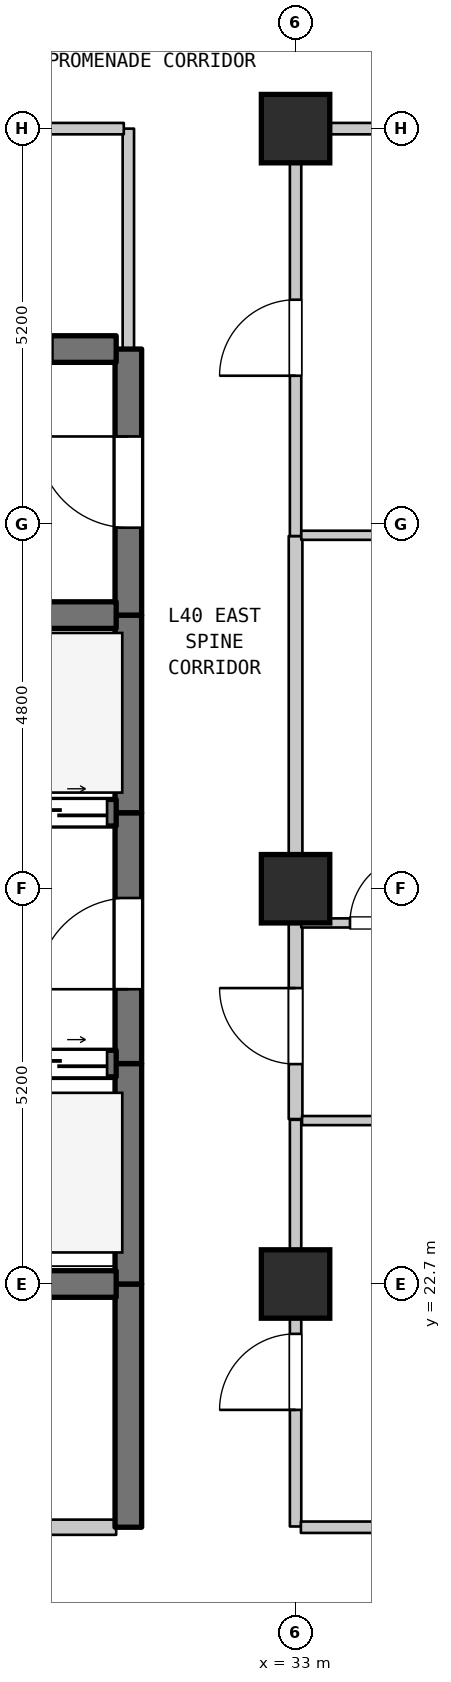
"""IFC4 building model, lengths in metres.
Left out: names, types, materials, properties, quantities, classifications, styles, units other than length and angle.
Written with IfcOpenShell. Run it as: python <this file> out.ifc"""

import sys

from ifc_helpers import new_model, si_unit, direction, frame, frame_2d, origin, origin_2d, place, context, subcontext, project, spatial, rectangle, extrude, element, fill, save


model = new_model("IFC4")
c1 = context("Model", 3, precision=1e-05, world=origin(), true_north=direction((0.0, 1.0)))
c2 = subcontext(c1, "Body", "Model", "MODEL_VIEW")
j1 = project(units=[si_unit("LENGTHUNIT", "METRE"), si_unit("PLANEANGLEUNIT", "RADIAN")], contexts=[c1])
p1 = place(None, origin())
s1 = spatial("IfcSite", under=j1, at=p1, CompositionType="ELEMENT")
p2 = place(p1, origin())
s2 = spatial("IfcBuilding", under=s1, at=p2, CompositionType="ELEMENT")
p3 = place(p2, frame((0.0, 0.0, 164.6)))
s3 = spatial("IfcBuildingStorey", under=s2, at=p3, CompositionType="ELEMENT", Elevation=164.6)
for number, where, z_axis, x_axis in (
    (1, (33.0, 22.7, 0.0), (0.0, 0.0, 1.0), (1.0, 0.0, 0.0)),
    (2, (33.0, 27.9, 0.0), (0.0, 0.0, 1.0), (1.0, 0.0, 0.0)),
    (3, (33.0, 37.9, 0.0), (0.0, 0.0, 1.0), (1.0, 0.0, 0.0)),
):
    element("IfcColumn", number, at=place(p3, frame(where, z_axis=z_axis, x_axis=x_axis)), inside=s3, PredefinedType="COLUMN", context=c2, shape_type="SweptSolid", body=[
        extrude(rectangle(XDim=0.9, YDim=0.9, at=origin_2d()), origin(), (0.0, 0.0, 1.0), 4.5),
    ])
p4 = place(p3, frame((30.8, 19.5, 0.0), z_axis=(0.0, 0.0, 1.0), x_axis=(0.0, 1.0, 0.0)))
e4 = element("IfcWall", 4, at=p4, inside=s3, PredefinedType="SHEAR", context=c2, shape_type="SweptSolid", body=[
    extrude(rectangle(XDim=3.2, YDim=0.35, at=frame_2d((1.6, 0.0))), origin(), (0.0, 0.0, 1.0), 4.19),
])
p5 = place(p3, frame((30.8, 22.7, 0.0), z_axis=(0.0, 0.0, 1.0), x_axis=(0.0, 1.0, 0.0)))
e5 = element("IfcWall", 5, at=p5, inside=s3, PredefinedType="SHEAR", context=c2, shape_type="SweptSolid", body=[
    extrude(rectangle(XDim=2.9, YDim=0.35, at=frame_2d((1.45, 0.0))), origin(), (0.0, 0.0, 1.0), 4.19),
])
p6 = place(p3, frame((30.8, 25.6, 0.0), z_axis=(0.0, 0.0, 1.0), x_axis=(0.0, 1.0, 0.0)))
e6 = element("IfcWall", 6, at=p6, inside=s3, PredefinedType="SHEAR", context=c2, shape_type="SweptSolid", body=[
    extrude(rectangle(XDim=3.3, YDim=0.35, at=frame_2d((1.65, 0.0))), origin(), (0.0, 0.0, 1.0), 4.19),
])
p7 = place(p6, frame((0.978, 0.0, 0.0)))
e7 = element("IfcOpeningElement", 7, at=p7, cuts=e6, PredefinedType="OPENING", context=c2, shape_type="SweptSolid", body=[
    extrude(rectangle(XDim=1.2, YDim=2.2, at=frame_2d((0.6, 1.1))), frame((0.0, 0.185, 0.0), z_axis=(0.0, -1.0, 0.0), x_axis=(1.0, 0.0, 0.0)), (0.0, 0.0, 1.0), 0.37),
])
p8 = place(p3, frame((30.8, 28.9, 0.0), z_axis=(0.0, 0.0, 1.0), x_axis=(0.0, 1.0, 0.0)))
e8 = element("IfcWall", 8, at=p8, inside=s3, PredefinedType="SHEAR", context=c2, shape_type="SweptSolid", body=[
    extrude(rectangle(XDim=2.6, YDim=0.35, at=frame_2d((1.3, 0.0))), origin(), (0.0, 0.0, 1.0), 4.19),
])
p9 = place(p3, frame((30.8, 31.5, 0.0), z_axis=(0.0, 0.0, 1.0), x_axis=(0.0, 1.0, 0.0)))
e9 = element("IfcWall", 9, at=p9, inside=s3, PredefinedType="SHEAR", context=c2, shape_type="SweptSolid", body=[
    extrude(rectangle(XDim=3.5, YDim=0.35, at=frame_2d((1.75, 0.0))), origin(), (0.0, 0.0, 1.0), 4.19),
])
p10 = place(p9, frame((1.15, 0.0, 0.0)))
e10 = element("IfcOpeningElement", 10, at=p10, cuts=e9, PredefinedType="OPENING", context=c2, shape_type="SweptSolid", body=[
    extrude(rectangle(XDim=1.2, YDim=2.2, at=frame_2d((0.6, 1.1))), frame((0.0, 0.185, 0.0), z_axis=(0.0, -1.0, 0.0), x_axis=(1.0, 0.0, 0.0)), (0.0, 0.0, 1.0), 0.37),
])
p11 = place(p3, frame((30.8, 35.0, 0.0), z_axis=(0.0, 0.0, 1.0), x_axis=(0.0, 1.0, 0.0)))
e11 = element("IfcWall", 11, at=p11, inside=s3, PredefinedType="STANDARD", context=c2, shape_type="SweptSolid", body=[
    extrude(rectangle(XDim=2.9, YDim=0.15, at=frame_2d((1.45, 0.0))), origin(), (0.0, 0.0, 1.0), 4.19),
])
p12 = place(p3, frame((33.0, 19.51, 0.0), z_axis=(0.0, 0.0, 1.0), x_axis=(0.0, 1.0, 0.0)))
e12 = element("IfcWall", 12, at=p12, inside=s3, PredefinedType="STANDARD", context=c2, shape_type="SweptSolid", body=[
    extrude(rectangle(XDim=5.35, YDim=0.15, at=frame_2d((2.675, 0.0))), origin(), (0.0, 0.0, 1.0), 3.79),
])
p13 = place(p12, frame((1.534, 0.0, 0.0)))
e13 = element("IfcOpeningElement", 13, at=p13, cuts=e12, PredefinedType="OPENING", context=c2, shape_type="SweptSolid", body=[
    extrude(rectangle(XDim=1.0, YDim=2.15, at=frame_2d((0.5, 1.075))), frame((0.0, 0.085, 0.0), z_axis=(0.0, -1.0, 0.0), x_axis=(1.0, 0.0, 0.0)), (0.0, 0.0, 1.0), 0.17),
])
p14 = place(p3, frame((33.0, 24.87, 0.0), z_axis=(0.0, 0.0, 1.0), x_axis=(0.0, 1.0, 0.0)))
e14 = element("IfcWall", 14, at=p14, inside=s3, PredefinedType="STANDARD", context=c2, shape_type="SweptSolid", body=[
    extrude(rectangle(XDim=2.6, YDim=0.18, at=frame_2d((1.3, 0.0))), origin(), (0.0, 0.0, 1.0), 3.79),
])
p15 = place(p14, frame((0.723, 0.0, 0.0)))
e15 = element("IfcOpeningElement", 15, at=p15, cuts=e14, PredefinedType="OPENING", context=c2, shape_type="SweptSolid", body=[
    extrude(rectangle(XDim=1.0, YDim=2.15, at=frame_2d((0.5, 1.075))), frame((0.0, 0.1, 0.0), z_axis=(0.0, -1.0, 0.0), x_axis=(1.0, 0.0, 0.0)), (0.0, 0.0, 1.0), 0.2),
])
p16 = place(p3, frame((33.0, 27.47, 0.0), z_axis=(0.0, 0.0, 1.0), x_axis=(0.0, 1.0, 0.0)))
e16 = element("IfcWall", 16, at=p16, inside=s3, PredefinedType="STANDARD", context=c2, shape_type="SweptSolid", body=[
    extrude(rectangle(XDim=5.07, YDim=0.18, at=frame_2d((2.535, 0.0))), origin(), (0.0, 0.0, 1.0), 3.69),
])
p17 = place(p3, frame((33.0, 32.54, 0.0), z_axis=(0.0, 0.0, 1.0), x_axis=(0.0, 1.0, 0.0)))
e17 = element("IfcWall", 17, at=p17, inside=s3, PredefinedType="STANDARD", context=c2, shape_type="SweptSolid", body=[
    extrude(rectangle(XDim=5.36, YDim=0.15, at=frame_2d((2.68, 0.0))), origin(), (0.0, 0.0, 1.0), 3.69),
])
p18 = place(p17, frame((2.109, 0.0, 0.0)))
e18 = element("IfcOpeningElement", 18, at=p18, cuts=e17, PredefinedType="OPENING", context=c2, shape_type="SweptSolid", body=[
    extrude(rectangle(XDim=1.0, YDim=2.15, at=frame_2d((0.5, 1.075))), frame((0.0, 0.085, 0.0), z_axis=(0.0, -1.0, 0.0), x_axis=(1.0, 0.0, 0.0)), (0.0, 0.0, 1.0), 0.17),
])
p19 = place(p3, frame((25.985, 19.5, 0.0), z_axis=(0.0, 0.0, 1.0), x_axis=(1.0, 0.0, 0.0)))
e19 = element("IfcWall", 19, at=p19, inside=s3, PredefinedType="STANDARD", context=c2, shape_type="SweptSolid", body=[
    extrude(rectangle(XDim=4.655, YDim=0.2, at=frame_2d((2.327, 0.0))), origin(), (0.0, 0.0, 1.0), 4.19),
])
p20 = place(p19, frame((1.845, 0.0, 0.0)))
e20 = element("IfcOpeningElement", 20, at=p20, cuts=e19, PredefinedType="OPENING", context=c2, shape_type="SweptSolid", body=[
    extrude(rectangle(XDim=0.9, YDim=2.15, at=frame_2d((0.45, 1.075))), frame((0.0, 0.11, 0.0), z_axis=(0.0, -1.0, 0.0), x_axis=(1.0, 0.0, 0.0)), (0.0, 0.0, 1.0), 0.22),
])
p21 = place(p3, frame((33.07, 19.5, 0.0), z_axis=(0.0, 0.0, 1.0), x_axis=(1.0, 0.0, 0.0)))
e21 = element("IfcWall", 21, at=p21, inside=s3, PredefinedType="STANDARD", context=c2, shape_type="SweptSolid", body=[
    extrude(rectangle(XDim=21.51, YDim=0.15, at=frame_2d((10.755, 0.0))), origin(), (0.0, 0.0, 1.0), 4.19),
])
p22 = place(p21, frame((10.185, 0.0, 0.0)))
e22 = element("IfcOpeningElement", 22, at=p22, cuts=e21, PredefinedType="OPENING", context=c2, shape_type="SweptSolid", body=[
    extrude(rectangle(XDim=1.0, YDim=2.15, at=frame_2d((0.5, 1.075))), frame((0.0, 0.085, 0.0), z_axis=(0.0, -1.0, 0.0), x_axis=(1.0, 0.0, 0.0)), (0.0, 0.0, 1.0), 0.17),
])
p23 = place(p3, frame((27.46, 22.7, 0.0), z_axis=(0.0, 0.0, 1.0), x_axis=(1.0, 0.0, 0.0)))
e23 = element("IfcWall", 23, at=p23, inside=s3, PredefinedType="SHEAR", context=c2, shape_type="SweptSolid", body=[
    extrude(rectangle(XDim=3.18, YDim=0.35, at=frame_2d((1.59, 0.0))), origin(), (0.0, 0.0, 1.0), 4.19),
])
p24 = place(p3, frame((33.085, 24.85, 0.0), z_axis=(0.0, 0.0, 1.0), x_axis=(1.0, 0.0, 0.0)))
e24 = element("IfcWall", 24, at=p24, inside=s3, PredefinedType="PARTITIONING", context=c2, shape_type="SweptSolid", body=[
    extrude(rectangle(XDim=23.905, YDim=0.12, at=frame_2d((11.953, 0.0))), origin(), (0.0, 0.0, 1.0), 4.19),
])
p25 = place(p3, frame((27.46, 25.6, 0.0), z_axis=(0.0, 0.0, 1.0), x_axis=(1.0, 0.0, 0.0)))
e25 = element("IfcWall", 25, at=p25, inside=s3, PredefinedType="SHEAR", context=c2, shape_type="SweptSolid", body=[
    extrude(rectangle(XDim=3.18, YDim=0.35, at=frame_2d((1.59, 0.0))), origin(), (0.0, 0.0, 1.0), 4.19),
])
p26 = place(p25, frame((0.12, 0.0, 0.0)))
e26 = element("IfcOpeningElement", 26, at=p26, cuts=e25, PredefinedType="OPENING", context=c2, shape_type="SweptSolid", body=[
    extrude(rectangle(XDim=1.25, YDim=2.2, at=frame_2d((0.625, 1.1))), frame((0.0, 0.185, 0.0), z_axis=(0.0, -1.0, 0.0), x_axis=(1.0, 0.0, 0.0)), (0.0, 0.0, 1.0), 0.37),
])
p27 = place(p25, frame((1.81, 0.0, 0.0)))
e27 = element("IfcOpeningElement", 27, at=p27, cuts=e25, PredefinedType="OPENING", context=c2, shape_type="SweptSolid", body=[
    extrude(rectangle(XDim=1.25, YDim=2.2, at=frame_2d((0.625, 1.1))), frame((0.0, 0.185, 0.0), z_axis=(0.0, -1.0, 0.0), x_axis=(1.0, 0.0, 0.0)), (0.0, 0.0, 1.0), 0.37),
])
p28 = place(p3, frame((33.075, 27.45, 0.0), z_axis=(0.0, 0.0, 1.0), x_axis=(1.0, 0.0, 0.0)))
e28 = element("IfcWall", 28, at=p28, inside=s3, PredefinedType="PARTITIONING", context=c2, shape_type="SweptSolid", body=[
    extrude(rectangle(XDim=2.364, YDim=0.12, at=frame_2d((1.182, 0.0))), origin(), (0.0, 0.0, 1.0), 4.19),
])
p29 = place(p28, frame((0.641, 0.0, 0.0)))
e29 = element("IfcOpeningElement", 29, at=p29, cuts=e28, PredefinedType="OPENING", context=c2, shape_type="SweptSolid", body=[
    extrude(rectangle(XDim=0.9, YDim=2.15, at=frame_2d((0.45, 1.075))), frame((0.0, 0.07, 0.0), z_axis=(0.0, -1.0, 0.0), x_axis=(1.0, 0.0, 0.0)), (0.0, 0.0, 1.0), 0.14),
])
p30 = place(p3, frame((27.46, 28.9, 0.0), z_axis=(0.0, 0.0, 1.0), x_axis=(1.0, 0.0, 0.0)))
e30 = element("IfcWall", 30, at=p30, inside=s3, PredefinedType="SHEAR", context=c2, shape_type="SweptSolid", body=[
    extrude(rectangle(XDim=3.18, YDim=0.35, at=frame_2d((1.59, 0.0))), origin(), (0.0, 0.0, 1.0), 4.19),
])
p31 = place(p30, frame((0.12, 0.0, 0.0)))
e31 = element("IfcOpeningElement", 31, at=p31, cuts=e30, PredefinedType="OPENING", context=c2, shape_type="SweptSolid", body=[
    extrude(rectangle(XDim=1.25, YDim=2.2, at=frame_2d((0.625, 1.1))), frame((0.0, 0.185, 0.0), z_axis=(0.0, -1.0, 0.0), x_axis=(1.0, 0.0, 0.0)), (0.0, 0.0, 1.0), 0.37),
])
p32 = place(p30, frame((1.81, 0.0, 0.0)))
e32 = element("IfcOpeningElement", 32, at=p32, cuts=e30, PredefinedType="OPENING", context=c2, shape_type="SweptSolid", body=[
    extrude(rectangle(XDim=1.25, YDim=2.2, at=frame_2d((0.625, 1.1))), frame((0.0, 0.185, 0.0), z_axis=(0.0, -1.0, 0.0), x_axis=(1.0, 0.0, 0.0)), (0.0, 0.0, 1.0), 0.37),
])
p33 = place(p3, frame((27.46, 31.5, 0.0), z_axis=(0.0, 0.0, 1.0), x_axis=(1.0, 0.0, 0.0)))
e33 = element("IfcWall", 33, at=p33, inside=s3, PredefinedType="SHEAR", context=c2, shape_type="SweptSolid", body=[
    extrude(rectangle(XDim=3.18, YDim=0.35, at=frame_2d((1.59, 0.0))), origin(), (0.0, 0.0, 1.0), 4.19),
])
p34 = place(p3, frame((33.075, 32.55, 0.0), z_axis=(0.0, 0.0, 1.0), x_axis=(1.0, 0.0, 0.0)))
e34 = element("IfcWall", 34, at=p34, inside=s3, PredefinedType="PARTITIONING", context=c2, shape_type="SweptSolid", body=[
    extrude(rectangle(XDim=2.364, YDim=0.12, at=frame_2d((1.182, 0.0))), origin(), (0.0, 0.0, 1.0), 4.19),
])
p35 = place(p3, frame((28.045, 35.0, 0.0), z_axis=(0.0, 0.0, 1.0), x_axis=(1.0, 0.0, 0.0)))
e35 = element("IfcWall", 35, at=p35, inside=s3, PredefinedType="SHEAR", context=c2, shape_type="SweptSolid", body=[
    extrude(rectangle(XDim=2.595, YDim=0.35, at=frame_2d((1.297, 0.0))), origin(), (0.0, 0.0, 1.0), 4.19),
])
p36 = place(p35, frame((0.806, 0.0, 0.0)))
e36 = element("IfcOpeningElement", 36, at=p36, cuts=e35, PredefinedType="OPENING", context=c2, shape_type="SweptSolid", body=[
    extrude(rectangle(XDim=0.95, YDim=2.15, at=frame_2d((0.475, 1.075))), frame((0.0, 0.185, 0.0), z_axis=(0.0, -1.0, 0.0), x_axis=(1.0, 0.0, 0.0)), (0.0, 0.0, 1.0), 0.37),
])
p37 = place(p3, frame((28.045, 37.9, 0.0), z_axis=(0.0, 0.0, 1.0), x_axis=(1.0, 0.0, 0.0)))
e37 = element("IfcWall", 37, at=p37, inside=s3, PredefinedType="STANDARD", context=c2, shape_type="SweptSolid", body=[
    extrude(rectangle(XDim=2.695, YDim=0.15, at=frame_2d((1.348, 0.0))), origin(), (0.0, 0.0, 1.0), 3.69),
])
p38 = place(p3, frame((33.06, 37.9, 0.0), z_axis=(0.0, 0.0, 1.0), x_axis=(1.0, 0.0, 0.0)))
e38 = element("IfcWall", 38, at=p38, inside=s3, PredefinedType="STANDARD", context=c2, shape_type="SweptSolid", body=[
    extrude(rectangle(XDim=7.164, YDim=0.15, at=frame_2d((3.582, 0.0))), origin(), (0.0, 0.0, 1.0), 4.19),
])
p39 = place(p38, frame((3.004, 0.0, 0.0)))
e39 = element("IfcOpeningElement", 39, at=p39, cuts=e38, PredefinedType="OPENING", context=c2, shape_type="SweptSolid", body=[
    extrude(rectangle(XDim=1.0, YDim=2.15, at=frame_2d((0.5, 1.075))), frame((0.0, 0.085, 0.0), z_axis=(0.0, -1.0, 0.0), x_axis=(1.0, 0.0, 0.0)), (0.0, 0.0, 1.0), 0.17),
])
p40 = place(p7, origin())
e40 = element("IfcDoor", 40, at=p40, inside=s3, OperationType="SINGLE_SWING_LEFT", PredefinedType="DOOR", context=c2, shape_type="SweptSolid", body=[
    extrude(rectangle(XDim=1.2, YDim=2.2, at=frame_2d((0.6, 1.1))), frame((0.0, 0.025, 0.0), z_axis=(0.0, -1.0, 0.0), x_axis=(1.0, 0.0, 0.0)), (0.0, 0.0, 1.0), 0.05),
])
fill(e7, e40)
p41 = place(p10, origin())
e41 = element("IfcDoor", 41, at=p41, inside=s3, OperationType="SINGLE_SWING_RIGHT", PredefinedType="DOOR", context=c2, shape_type="SweptSolid", body=[
    extrude(rectangle(XDim=1.2, YDim=2.2, at=frame_2d((0.6, 1.1))), frame((0.0, 0.025, 0.0), z_axis=(0.0, -1.0, 0.0), x_axis=(1.0, 0.0, 0.0)), (0.0, 0.0, 1.0), 0.05),
])
fill(e10, e41)
p42 = place(p13, origin())
e42 = element("IfcDoor", 42, at=p42, inside=s3, OperationType="SINGLE_SWING_LEFT", PredefinedType="DOOR", context=c2, shape_type="SweptSolid", body=[
    extrude(rectangle(XDim=1.0, YDim=2.15, at=frame_2d((0.5, 1.075))), frame((0.0, 0.025, 0.0), z_axis=(0.0, -1.0, 0.0), x_axis=(1.0, 0.0, 0.0)), (0.0, 0.0, 1.0), 0.05),
])
fill(e13, e42)
p43 = place(p15, origin())
e43 = element("IfcDoor", 43, at=p43, inside=s3, OperationType="SINGLE_SWING_RIGHT", PredefinedType="DOOR", context=c2, shape_type="SweptSolid", body=[
    extrude(rectangle(XDim=1.0, YDim=2.15, at=frame_2d((0.5, 1.075))), frame((0.0, 0.025, 0.0), z_axis=(0.0, -1.0, 0.0), x_axis=(1.0, 0.0, 0.0)), (0.0, 0.0, 1.0), 0.05),
])
fill(e15, e43)
p44 = place(p18, origin())
e44 = element("IfcDoor", 44, at=p44, inside=s3, OperationType="SINGLE_SWING_LEFT", PredefinedType="DOOR", context=c2, shape_type="SweptSolid", body=[
    extrude(rectangle(XDim=1.0, YDim=2.15, at=frame_2d((0.5, 1.075))), frame((0.0, 0.025, 0.0), z_axis=(0.0, -1.0, 0.0), x_axis=(1.0, 0.0, 0.0)), (0.0, 0.0, 1.0), 0.05),
])
fill(e18, e44)
p45 = place(p27, origin())
e45 = element("IfcDoor", 45, at=p45, inside=s3, OperationType="DOUBLE_DOOR_SLIDING", PredefinedType="DOOR", context=c2, shape_type="SweptSolid", body=[
    extrude(rectangle(XDim=1.25, YDim=2.2, at=frame_2d((0.625, 1.1))), frame((0.0, 0.025, 0.0), z_axis=(0.0, -1.0, 0.0), x_axis=(1.0, 0.0, 0.0)), (0.0, 0.0, 1.0), 0.05),
])
fill(e27, e45)
p46 = place(p29, origin())
e46 = element("IfcDoor", 46, at=p46, inside=s3, OperationType="SINGLE_SWING_RIGHT", PredefinedType="DOOR", context=c2, shape_type="SweptSolid", body=[
    extrude(rectangle(XDim=0.9, YDim=2.15, at=frame_2d((0.45, 1.075))), frame((0.0, 0.025, 0.0), z_axis=(0.0, -1.0, 0.0), x_axis=(1.0, 0.0, 0.0)), (0.0, 0.0, 1.0), 0.05),
])
fill(e29, e46)
p47 = place(p32, origin())
e47 = element("IfcDoor", 47, at=p47, inside=s3, OperationType="DOUBLE_DOOR_SLIDING", PredefinedType="DOOR", context=c2, shape_type="SweptSolid", body=[
    extrude(rectangle(XDim=1.25, YDim=2.2, at=frame_2d((0.625, 1.1))), frame((0.0, 0.025, 0.0), z_axis=(0.0, -1.0, 0.0), x_axis=(1.0, 0.0, 0.0)), (0.0, 0.0, 1.0), 0.05),
])
fill(e32, e47)
p48 = place(p36, frame((0.95, 0.0, 0.0), z_axis=(0.0, 0.0, 1.0), x_axis=(-1.0, 0.0, 0.0)))
e48 = element("IfcDoor", 48, at=p48, inside=s3, OperationType="SINGLE_SWING_LEFT", PredefinedType="DOOR", context=c2, shape_type="SweptSolid", body=[
    extrude(rectangle(XDim=0.95, YDim=2.15, at=frame_2d((0.475, 1.075))), frame((0.0, 0.025, 0.0), z_axis=(0.0, -1.0, 0.0), x_axis=(1.0, 0.0, 0.0)), (0.0, 0.0, 1.0), 0.05),
])
fill(e36, e48)
save(model, sys.argv[1])
